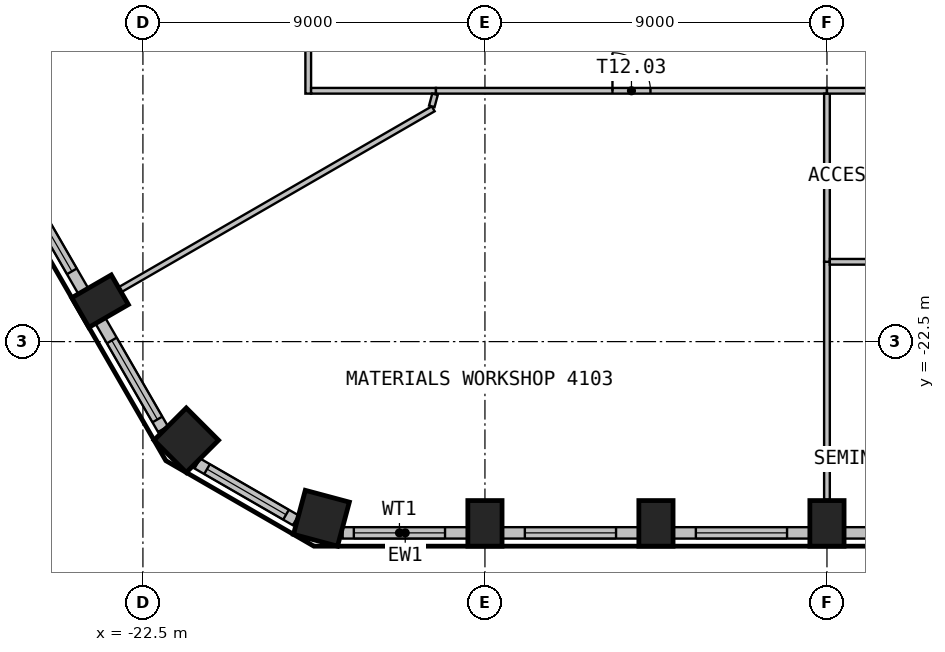
"""IFC4 building model, lengths in metres.
Left out: names, types, materials, properties, quantities, classifications, styles, units other than length and angle.
Written with IfcOpenShell. Run it as: python <this file> out.ifc"""

import sys

from ifc_helpers import new_model, si_unit, direction, frame, frame_2d, origin, origin_2d, place, context, subcontext, project, spatial, rectangle, extrude, element, fill, save


model = new_model("IFC4")
c1 = context("Model", 3, precision=1e-05, world=origin(), true_north=direction((0.0, 1.0)))
c2 = subcontext(c1, "Body", "Model", "MODEL_VIEW")
j1 = project(units=[si_unit("LENGTHUNIT", "METRE"), si_unit("PLANEANGLEUNIT", "RADIAN")], contexts=[c1])
p1 = place(None, origin())
s1 = spatial("IfcSite", under=j1, at=p1, CompositionType="ELEMENT")
p2 = place(p1, origin())
s2 = spatial("IfcBuilding", under=s1, at=p2, CompositionType="ELEMENT")
p3 = place(p2, frame((0.0, 0.0, 167.7)))
s3 = spatial("IfcBuildingStorey", under=s2, at=p3, CompositionType="ELEMENT", Elevation=167.7)
p4 = place(p3, frame((-17.803, -27.148, 0.0), z_axis=(0.0, 0.0, 1.0), x_axis=(0.965925826289, -0.258819045103, 0.0)))
e1 = element("IfcColumn", 1, at=p4, inside=s3, PredefinedType="COLUMN", context=c2, shape_type="SweptSolid", body=[
    extrude(rectangle(XDim=1.2, YDim=1.2, at=origin_2d()), origin(), (0.0, 0.0, 1.0), 3.575),
])
for number, where, z_axis, x_axis in (
    (2, (-13.5, -27.283, 0.0), (0.0, 0.0, 1.0), (1.0, 0.0, 0.0)),
    (3, (-9.0, -27.283, 0.0), (0.0, 0.0, 1.0), (1.0, 0.0, 0.0)),
    (4, (-4.5, -27.283, 0.0), (0.0, 0.0, 1.0), (1.0, 0.0, 0.0)),
    (5, (-23.627, -21.436, 0.0), (0.0, 0.0, 1.0), (0.5, -0.866, 0.0)),
):
    element("IfcColumn", number, at=place(p3, frame(where, z_axis=z_axis, x_axis=x_axis)), inside=s3, PredefinedType="COLUMN", context=c2, shape_type="SweptSolid", body=[
        extrude(rectangle(XDim=0.9, YDim=1.2, at=origin_2d()), origin(), (0.0, 0.0, 1.0), 3.575),
    ])
p5 = place(p3, frame((-21.359, -25.095, 0.0), z_axis=(0.0, 0.0, 1.0), x_axis=(0.707106781187, -0.707106781187, 0.0)))
e6 = element("IfcColumn", 6, at=p5, inside=s3, PredefinedType="COLUMN", context=c2, shape_type="SweptSolid", body=[
    extrude(rectangle(XDim=1.2, YDim=1.2, at=origin_2d()), origin(), (0.0, 0.0, 1.0), 3.575),
])
p6 = place(p3, frame((-17.245, -27.533, 0.0), z_axis=(0.0, 0.0, 1.0), x_axis=(1.0, 0.0, 0.0)))
e7 = element("IfcWall", 7, at=p6, inside=s3, PredefinedType="SOLIDWALL", context=c2, shape_type="SweptSolid", body=[
    extrude(rectangle(XDim=3.294, YDim=0.3, at=frame_2d((1.647, 0.0))), origin(), (0.0, 0.0, 1.0), 3.575),
])
p7 = place(p6, frame((0.295, 0.0, 0.9)))
e8 = element("IfcOpeningElement", 8, at=p7, cuts=e7, PredefinedType="OPENING", context=c2, shape_type="SweptSolid", body=[
    extrude(rectangle(XDim=2.4, YDim=2.1, at=frame_2d((1.2, 1.05))), frame((0.0, 0.16, 0.0), z_axis=(0.0, -1.0, 0.0), x_axis=(1.0, 0.0, 0.0)), (0.0, 0.0, 1.0), 0.32),
])
p8 = place(p3, frame((-13.05, -27.533, 0.0), z_axis=(0.0, 0.0, 1.0), x_axis=(1.0, 0.0, 0.0)))
e9 = element("IfcWall", 9, at=p8, inside=s3, PredefinedType="SOLIDWALL", context=c2, shape_type="SweptSolid", body=[
    extrude(rectangle(XDim=3.599, YDim=0.3, at=frame_2d((1.8, 0.0))), origin(), (0.0, 0.0, 1.0), 3.575),
])
p9 = place(p8, frame((0.6, 0.0, 0.9)))
e10 = element("IfcOpeningElement", 10, at=p9, cuts=e9, PredefinedType="OPENING", context=c2, shape_type="SweptSolid", body=[
    extrude(rectangle(XDim=2.4, YDim=2.1, at=frame_2d((1.2, 1.05))), frame((0.0, 0.16, 0.0), z_axis=(0.0, -1.0, 0.0), x_axis=(1.0, 0.0, 0.0)), (0.0, 0.0, 1.0), 0.32),
])
p10 = place(p3, frame((-8.55, -27.533, 0.0), z_axis=(0.0, 0.0, 1.0), x_axis=(1.0, 0.0, 0.0)))
e11 = element("IfcWall", 11, at=p10, inside=s3, PredefinedType="SOLIDWALL", context=c2, shape_type="SweptSolid", body=[
    extrude(rectangle(XDim=3.599, YDim=0.3, at=frame_2d((1.8, 0.0))), origin(), (0.0, 0.0, 1.0), 3.575),
])
p11 = place(p10, frame((0.6, 0.0, 0.9)))
e12 = element("IfcOpeningElement", 12, at=p11, cuts=e11, PredefinedType="OPENING", context=c2, shape_type="SweptSolid", body=[
    extrude(rectangle(XDim=2.4, YDim=2.1, at=frame_2d((1.2, 1.05))), frame((0.0, 0.16, 0.0), z_axis=(0.0, -1.0, 0.0), x_axis=(1.0, 0.0, 0.0)), (0.0, 0.0, 1.0), 0.32),
])
p12 = place(p3, frame((-4.05, -27.533, 0.0), z_axis=(0.0, 0.0, 1.0), x_axis=(1.0, 0.0, 0.0)))
e13 = element("IfcWall", 13, at=p12, inside=s3, PredefinedType="SOLIDWALL", context=c2, shape_type="SweptSolid", body=[
    extrude(rectangle(XDim=3.599, YDim=0.3, at=frame_2d((1.8, 0.0))), origin(), (0.0, 0.0, 1.0), 3.575),
])
p13 = place(p12, frame((0.6, 0.0, 0.9)))
e14 = element("IfcOpeningElement", 14, at=p13, cuts=e13, PredefinedType="OPENING", context=c2, shape_type="SweptSolid", body=[
    extrude(rectangle(XDim=2.4, YDim=2.1, at=frame_2d((1.2, 1.05))), frame((0.0, 0.16, 0.0), z_axis=(0.0, -1.0, 0.0), x_axis=(1.0, 0.0, 0.0)), (0.0, 0.0, 1.0), 0.32),
])
p14 = place(p3, frame((-25.869, -18.054, 0.0), z_axis=(0.0, 0.0, 1.0), x_axis=(0.500027802648, -0.866009351323, 0.0)))
e15 = element("IfcWall", 15, at=p14, inside=s3, PredefinedType="SOLIDWALL", context=c2, shape_type="SweptSolid", body=[
    extrude(rectangle(XDim=3.599, YDim=0.3, at=frame_2d((1.799, 0.0))), origin(), (0.0, 0.0, 1.0), 3.575),
])
p15 = place(p14, frame((0.6, 0.0, 0.9)))
e16 = element("IfcOpeningElement", 16, at=p15, cuts=e15, PredefinedType="OPENING", context=c2, shape_type="SweptSolid", body=[
    extrude(rectangle(XDim=2.4, YDim=2.1, at=frame_2d((1.2, 1.05))), frame((0.0, 0.16, 0.0), z_axis=(0.0, -1.0, 0.0), x_axis=(1.0, 0.0, 0.0)), (0.0, 0.0, 1.0), 0.32),
])
p16 = place(p3, frame((-23.619, -21.951, 0.0), z_axis=(0.0, 0.0, 1.0), x_axis=(0.500036802197, -0.866004154983, 0.0)))
e17 = element("IfcWall", 17, at=p16, inside=s3, PredefinedType="SOLIDWALL", context=c2, shape_type="SweptSolid", body=[
    extrude(rectangle(XDim=3.294, YDim=0.3, at=frame_2d((1.647, 0.0))), origin(), (0.0, 0.0, 1.0), 3.575),
])
p17 = place(p16, frame((0.6, 0.0, 0.9)))
e18 = element("IfcOpeningElement", 18, at=p17, cuts=e17, PredefinedType="OPENING", context=c2, shape_type="SweptSolid", body=[
    extrude(rectangle(XDim=2.4, YDim=2.1, at=frame_2d((1.2, 1.05))), frame((0.0, 0.16, 0.0), z_axis=(0.0, -1.0, 0.0), x_axis=(1.0, 0.0, 0.0)), (0.0, 0.0, 1.0), 0.32),
])
p18 = place(p3, frame((-21.068, -25.707, 0.0), z_axis=(0.0, 0.0, 1.0), x_axis=(0.866012844897, -0.500021752, 0.0)))
e19 = element("IfcWall", 19, at=p18, inside=s3, PredefinedType="SOLIDWALL", context=c2, shape_type="SweptSolid", body=[
    extrude(rectangle(XDim=2.989, YDim=0.3, at=frame_2d((1.495, 0.0))), origin(), (0.0, 0.0, 1.0), 3.575),
])
p19 = place(p18, frame((0.295, 0.0, 0.9)))
e20 = element("IfcOpeningElement", 20, at=p19, cuts=e19, PredefinedType="OPENING", context=c2, shape_type="SweptSolid", body=[
    extrude(rectangle(XDim=2.4, YDim=2.1, at=frame_2d((1.2, 1.05))), frame((0.0, 0.16, 0.0), z_axis=(0.0, -1.0, 0.0), x_axis=(1.0, 0.0, 0.0)), (0.0, 0.0, 1.0), 0.32),
])
p20 = place(p3, frame((-14.861, -16.375, 0.0), z_axis=(0.0, 0.0, 1.0), x_axis=(-0.866011447264, -0.500024172624, 0.0)))
e21 = element("IfcWall", 21, at=p20, inside=s3, PredefinedType="PARTITIONING", context=c2, shape_type="SweptSolid", body=[
    extrude(rectangle(XDim=9.502, YDim=0.15, at=frame_2d((4.751, 0.0))), origin(), (0.0, 0.0, 1.0), 3.575),
])
p21 = place(p3, frame((-18.15, 2.371, 0.0), z_axis=(0.0, 0.0, 1.0), x_axis=(0.0, -1.0, 0.0)))
e22 = element("IfcWall", 22, at=p21, inside=s3, PredefinedType="PARTITIONING", context=c2, shape_type="SweptSolid", body=[
    extrude(rectangle(XDim=18.346, YDim=0.15, at=frame_2d((9.173, 0.0))), origin(), (0.0, 0.0, 1.0), 3.575),
])
p22 = place(p21, frame((8.673, 0.0, 0.0)))
e23 = element("IfcOpeningElement", 23, at=p22, cuts=e22, PredefinedType="OPENING", context=c2, shape_type="SweptSolid", body=[
    extrude(rectangle(XDim=1.0, YDim=2.1, at=frame_2d((0.5, 1.05))), frame((0.0, 0.085, 0.0), z_axis=(0.0, -1.0, 0.0), x_axis=(1.0, 0.0, 0.0)), (0.0, 0.0, 1.0), 0.17),
])
p23 = place(p3, frame((-18.075, -15.9, 0.0), z_axis=(0.0, 0.0, 1.0), x_axis=(1.0, 0.0, 0.0)))
e24 = element("IfcWall", 24, at=p23, inside=s3, PredefinedType="PARTITIONING", context=c2, shape_type="SweptSolid", body=[
    extrude(rectangle(XDim=3.286, YDim=0.15, at=frame_2d((1.643, 0.0))), origin(), (0.0, 0.0, 1.0), 3.575),
])
p24 = place(p3, frame((-14.814, -15.992, 0.0), z_axis=(0.0, 0.0, 1.0), x_axis=(-0.257478443243, -0.966284042746, 0.0)))
e25 = element("IfcWall", 25, at=p24, inside=s3, PredefinedType="PARTITIONING", context=c2, shape_type="SweptSolid", body=[
    extrude(rectangle(XDim=0.33, YDim=0.15, at=frame_2d((0.165, 0.0))), origin(), (0.0, 0.0, 1.0), 3.575),
])
p25 = place(p3, frame((-14.789, -15.9, 0.0), z_axis=(0.0, 0.0, 1.0), x_axis=(1.0, 0.0, 0.0)))
e26 = element("IfcWall", 26, at=p25, inside=s3, PredefinedType="PARTITIONING", context=c2, shape_type="SweptSolid", body=[
    extrude(rectangle(XDim=10.289, YDim=0.15, at=frame_2d((5.145, 0.0))), origin(), (0.0, 0.0, 1.0), 3.575),
])
p26 = place(p25, frame((4.645, 0.0, 0.0)))
e27 = element("IfcOpeningElement", 27, at=p26, cuts=e26, PredefinedType="OPENING", context=c2, shape_type="SweptSolid", body=[
    extrude(rectangle(XDim=1.0, YDim=2.1, at=frame_2d((0.5, 1.05))), frame((0.0, 0.085, 0.0), z_axis=(0.0, -1.0, 0.0), x_axis=(1.0, 0.0, 0.0)), (0.0, 0.0, 1.0), 0.17),
])
p27 = place(p3, frame((-4.5, -20.4, 0.0), z_axis=(0.0, 0.0, 1.0), x_axis=(0.0, -1.0, 0.0)))
e28 = element("IfcWall", 28, at=p27, inside=s3, PredefinedType="PARTITIONING", context=c2, shape_type="SweptSolid", body=[
    extrude(rectangle(XDim=6.263, YDim=0.15, at=frame_2d((3.131, 0.0))), origin(), (0.0, 0.0, 1.0), 3.575),
])
p28 = place(p3, frame((-4.5, -15.975, 0.0), z_axis=(0.0, 0.0, 1.0), x_axis=(0.0, -1.0, 0.0)))
e29 = element("IfcWall", 29, at=p28, inside=s3, PredefinedType="PARTITIONING", context=c2, shape_type="SweptSolid", body=[
    extrude(rectangle(XDim=4.425, YDim=0.15, at=frame_2d((2.212, 0.0))), origin(), (0.0, 0.0, 1.0), 3.575),
])
p29 = place(p3, frame((-4.425, -20.4, 0.0), z_axis=(0.0, 0.0, 1.0), x_axis=(1.0, 0.0, 0.0)))
e30 = element("IfcWall", 30, at=p29, inside=s3, PredefinedType="PARTITIONING", context=c2, shape_type="SweptSolid", body=[
    extrude(rectangle(XDim=4.35, YDim=0.15, at=frame_2d((2.175, 0.0))), origin(), (0.0, 0.0, 1.0), 3.575),
])
p30 = place(p3, frame((-4.5, -15.9, 0.0), z_axis=(0.0, 0.0, 1.0), x_axis=(1.0, 0.0, 0.0)))
e31 = element("IfcWall", 31, at=p30, inside=s3, PredefinedType="PARTITIONING", context=c2, shape_type="SweptSolid", body=[
    extrude(rectangle(XDim=4.575, YDim=0.15, at=frame_2d((2.288, 0.0))), origin(), (0.0, 0.0, 1.0), 3.575),
])
p31 = place(p30, frame((1.788, 0.0, 0.0)))
e32 = element("IfcOpeningElement", 32, at=p31, cuts=e31, PredefinedType="OPENING", context=c2, shape_type="SweptSolid", body=[
    extrude(rectangle(XDim=1.0, YDim=2.1, at=frame_2d((0.5, 1.05))), frame((0.0, 0.085, 0.0), z_axis=(0.0, -1.0, 0.0), x_axis=(1.0, 0.0, 0.0)), (0.0, 0.0, 1.0), 0.17),
])
p32 = place(p7, origin())
e33 = element("IfcWindow", 33, at=p32, inside=s3, PartitioningType="SINGLE_PANEL", PredefinedType="WINDOW", context=c2, shape_type="SweptSolid", body=[
    extrude(rectangle(XDim=2.4, YDim=2.1, at=frame_2d((1.2, 1.05))), frame((0.0, 0.03, 0.0), z_axis=(0.0, -1.0, 0.0), x_axis=(1.0, 0.0, 0.0)), (0.0, 0.0, 1.0), 0.06),
])
fill(e8, e33)
p33 = place(p9, origin())
e34 = element("IfcWindow", 34, at=p33, inside=s3, PartitioningType="SINGLE_PANEL", PredefinedType="WINDOW", context=c2, shape_type="SweptSolid", body=[
    extrude(rectangle(XDim=2.4, YDim=2.1, at=frame_2d((1.2, 1.05))), frame((0.0, 0.03, 0.0), z_axis=(0.0, -1.0, 0.0), x_axis=(1.0, 0.0, 0.0)), (0.0, 0.0, 1.0), 0.06),
])
fill(e10, e34)
p34 = place(p11, origin())
e35 = element("IfcWindow", 35, at=p34, inside=s3, PartitioningType="SINGLE_PANEL", PredefinedType="WINDOW", context=c2, shape_type="SweptSolid", body=[
    extrude(rectangle(XDim=2.4, YDim=2.1, at=frame_2d((1.2, 1.05))), frame((0.0, 0.03, 0.0), z_axis=(0.0, -1.0, 0.0), x_axis=(1.0, 0.0, 0.0)), (0.0, 0.0, 1.0), 0.06),
])
fill(e12, e35)
p35 = place(p15, origin())
e36 = element("IfcWindow", 36, at=p35, inside=s3, PartitioningType="SINGLE_PANEL", PredefinedType="WINDOW", context=c2, shape_type="SweptSolid", body=[
    extrude(rectangle(XDim=2.4, YDim=2.1, at=frame_2d((1.2, 1.05))), frame((0.0, 0.03, 0.0), z_axis=(0.0, -1.0, 0.0), x_axis=(1.0, 0.0, 0.0)), (0.0, 0.0, 1.0), 0.06),
])
fill(e16, e36)
p36 = place(p17, origin())
e37 = element("IfcWindow", 37, at=p36, inside=s3, PartitioningType="SINGLE_PANEL", PredefinedType="WINDOW", context=c2, shape_type="SweptSolid", body=[
    extrude(rectangle(XDim=2.4, YDim=2.1, at=frame_2d((1.2, 1.05))), frame((0.0, 0.03, 0.0), z_axis=(0.0, -1.0, 0.0), x_axis=(1.0, 0.0, 0.0)), (0.0, 0.0, 1.0), 0.06),
])
fill(e18, e37)
p37 = place(p19, origin())
e38 = element("IfcWindow", 38, at=p37, inside=s3, PartitioningType="SINGLE_PANEL", PredefinedType="WINDOW", context=c2, shape_type="SweptSolid", body=[
    extrude(rectangle(XDim=2.4, YDim=2.1, at=frame_2d((1.2, 1.05))), frame((0.0, 0.03, 0.0), z_axis=(0.0, -1.0, 0.0), x_axis=(1.0, 0.0, 0.0)), (0.0, 0.0, 1.0), 0.06),
])
fill(e20, e38)
p38 = place(p26, origin())
e39 = element("IfcDoor", 39, at=p38, inside=s3, OperationType="SINGLE_SWING_RIGHT", PredefinedType="DOOR", context=c2, shape_type="SweptSolid", body=[
    extrude(rectangle(XDim=1.0, YDim=2.1, at=frame_2d((0.5, 1.05))), frame((0.0, 0.025, 0.0), z_axis=(0.0, -1.0, 0.0), x_axis=(1.0, 0.0, 0.0)), (0.0, 0.0, 1.0), 0.05),
])
fill(e27, e39)
save(model, sys.argv[1])
